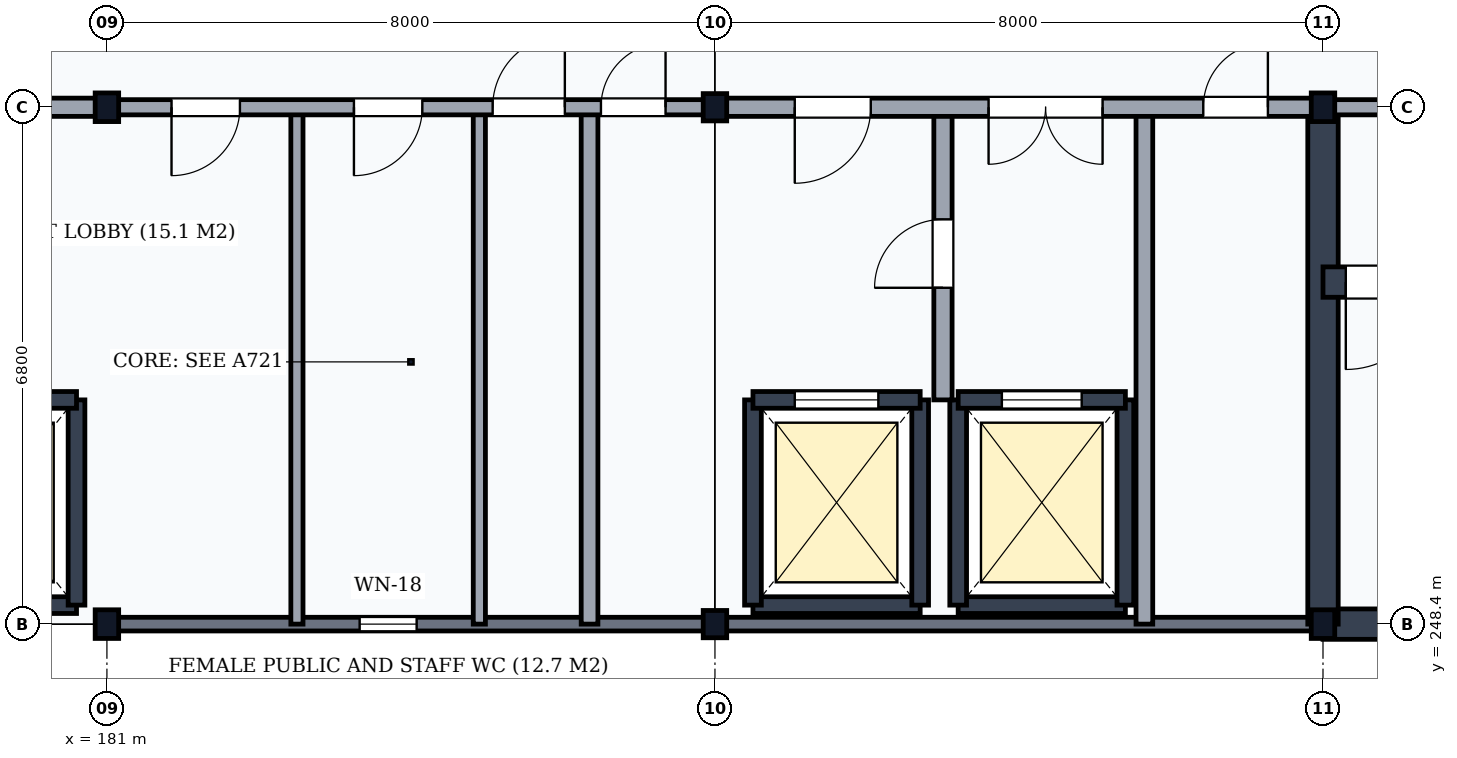
"""IFC4 building model, lengths in metres.
Left out: names, types, materials, properties, quantities, classifications, styles, units other than length and angle.
Written with IfcOpenShell. Run it as: python <this file> out.ifc"""

import sys

from ifc_helpers import new_model, si_unit, direction, frame, frame_2d, origin, origin_2d, place, context, subcontext, project, spatial, rectangle, i_section, extrude, element, fill, save


model = new_model("IFC4")
c1 = context("Model", 3, precision=1e-05, world=origin(), true_north=direction((0.0, 1.0)))
c2 = subcontext(c1, "Body", "Model", "MODEL_VIEW")
j1 = project(units=[si_unit("LENGTHUNIT", "METRE"), si_unit("PLANEANGLEUNIT", "RADIAN")], contexts=[c1])
p1 = place(None, origin())
s1 = spatial("IfcSite", under=j1, at=p1, CompositionType="ELEMENT")
p2 = place(p1, origin())
s2 = spatial("IfcBuilding", under=s1, at=p2, CompositionType="ELEMENT")
p3 = place(p2, frame((0.0, 0.0, 43.8)))
s3 = spatial("IfcBuildingStorey", under=s2, at=p3, CompositionType="ELEMENT", Elevation=43.8)
for number, where, z_axis, x_axis in (
    (1, (181.0, 248.4, 0.0), (0.0, 0.0, 1.0), (1.0, 0.0, 0.0)),
    (2, (181.0, 255.2, 0.0), (0.0, 0.0, 1.0), (1.0, 0.0, 0.0)),
):
    element("IfcColumn", number, at=place(p3, frame(where, z_axis=z_axis, x_axis=x_axis)), inside=s3, PredefinedType="COLUMN", context=c2, shape_type="SweptSolid", body=[
        extrude(i_section(OverallWidth=0.309, OverallDepth=0.377, WebThickness=0.021, FlangeThickness=0.04, FilletRadius=0.027, at=origin_2d()), origin(), (0.0, 0.0, 1.0), 3.9),
    ])
for number, where, z_axis, x_axis in (
    (3, (189.0, 248.4, 0.0), (0.0, 0.0, 1.0), (1.0, 0.0, 0.0)),
    (4, (189.0, 255.2, 0.0), (0.0, 0.0, 1.0), (1.0, 0.0, 0.0)),
):
    element("IfcColumn", number, at=place(p3, frame(where, z_axis=z_axis, x_axis=x_axis)), inside=s3, PredefinedType="COLUMN", context=c2, shape_type="SweptSolid", body=[
        extrude(i_section(OverallWidth=0.309, OverallDepth=0.359, WebThickness=0.021, FlangeThickness=0.04, FilletRadius=0.027, at=origin_2d()), origin(), (0.0, 0.0, 1.0), 3.9),
    ])
for number, where, z_axis, x_axis in (
    (5, (197.0, 248.4, 0.0), (0.0, 0.0, 1.0), (1.0, 0.0, 0.0)),
    (6, (197.0, 255.2, 0.0), (0.0, 0.0, 1.0), (1.0, 0.0, 0.0)),
):
    element("IfcColumn", number, at=place(p3, frame(where, z_axis=z_axis, x_axis=x_axis)), inside=s3, PredefinedType="COLUMN", context=c2, shape_type="SweptSolid", body=[
        extrude(i_section(OverallWidth=0.309, OverallDepth=0.377, WebThickness=0.021, FlangeThickness=0.04, FilletRadius=0.027, at=origin_2d()), origin(), (0.0, 0.0, 1.0), 3.9),
    ])
p4 = place(p3, frame((181.006, 248.4, 0.0), z_axis=(0.0, 0.0, 1.0), x_axis=(1.0, 0.0, 0.0)))
e7 = element("IfcWall", 7, at=p4, inside=s3, PredefinedType="SOLIDWALL", context=c2, shape_type="SweptSolid", body=[
    extrude(rectangle(XDim=7.988, YDim=0.18, at=frame_2d((3.994, 0.0))), origin(), (0.0, 0.0, 1.0), 3.368),
])
p5 = place(p4, frame((3.319, 0.0, 0.85)))
e8 = element("IfcOpeningElement", 8, at=p5, cuts=e7, PredefinedType="OPENING", context=c2, shape_type="SweptSolid", body=[
    extrude(rectangle(XDim=0.75, YDim=2.0, at=frame_2d((0.375, 1.0))), frame((0.0, 0.105, 0.0), z_axis=(0.0, -1.0, 0.0), x_axis=(1.0, 0.0, 0.0)), (0.0, 0.0, 1.0), 0.21),
])
p6 = place(p3, frame((189.006, 248.4, 0.0), z_axis=(0.0, 0.0, 1.0), x_axis=(1.0, 0.0, 0.0)))
e9 = element("IfcWall", 9, at=p6, inside=s3, PredefinedType="SOLIDWALL", context=c2, shape_type="SweptSolid", body=[
    extrude(rectangle(XDim=7.988, YDim=0.18, at=frame_2d((3.994, 0.0))), origin(), (0.0, 0.0, 1.0), 3.368),
])
p7 = place(p3, frame((197.0, 248.4, 0.0), z_axis=(0.0, 0.0, 1.0), x_axis=(1.0, 0.0, 0.0)))
e10 = element("IfcWall", 10, at=p7, inside=s3, PredefinedType="SHEAR", context=c2, shape_type="SweptSolid", body=[
    extrude(rectangle(XDim=8.0, YDim=0.4, at=frame_2d((4.0, 0.0))), origin(), (0.0, 0.0, 1.0), 3.68),
])
p8 = place(p3, frame((197.0, 248.4, 0.0), z_axis=(0.0, 0.0, 1.0), x_axis=(0.0, 1.0, 0.0)))
e11 = element("IfcWall", 11, at=p8, inside=s3, PredefinedType="SHEAR", context=c2, shape_type="SweptSolid", body=[
    extrude(rectangle(XDim=6.8, YDim=0.4, at=frame_2d((3.4, 0.0))), origin(), (0.0, 0.0, 1.0), 3.68),
])
p9 = place(p3, frame((197.0, 252.9, 0.0), z_axis=(0.0, 0.0, 1.0), x_axis=(1.0, 0.0, 0.0)))
e12 = element("IfcWall", 12, at=p9, inside=s3, PredefinedType="SHEAR", context=c2, shape_type="SweptSolid", body=[
    extrude(rectangle(XDim=8.0, YDim=0.4, at=frame_2d((4.0, 0.0))), origin(), (0.0, 0.0, 1.0), 3.68),
])
p10 = place(p9, frame((0.3, 0.0, 0.0)))
e13 = element("IfcOpeningElement", 13, at=p10, cuts=e12, PredefinedType="OPENING", context=c2, shape_type="SweptSolid", body=[
    extrude(rectangle(XDim=1.15, YDim=2.15, at=frame_2d((0.575, 1.075))), frame((0.0, 0.215, 0.0), z_axis=(0.0, -1.0, 0.0), x_axis=(1.0, 0.0, 0.0)), (0.0, 0.0, 1.0), 0.43),
])
p11 = place(p3, frame((197.0, 255.2, 0.0), z_axis=(0.0, 0.0, 1.0), x_axis=(1.0, 0.0, 0.0)))
e14 = element("IfcWall", 14, at=p11, inside=s3, PredefinedType="PARTITIONING", context=c2, shape_type="SweptSolid", body=[
    extrude(rectangle(XDim=8.0, YDim=0.2, at=frame_2d((4.0, 0.0))), origin(), (0.0, 0.0, 1.0), 3.178),
])
p12 = place(p11, frame((3.275, 0.0, 0.0)))
e15 = element("IfcOpeningElement", 15, at=p12, cuts=e14, PredefinedType="OPENING", context=c2, shape_type="SweptSolid", body=[
    extrude(rectangle(XDim=1.45, YDim=2.2, at=frame_2d((0.725, 1.1))), frame((0.0, 0.115, 0.0), z_axis=(0.0, -1.0, 0.0), x_axis=(1.0, 0.0, 0.0)), (0.0, 0.0, 1.0), 0.23),
])
p13 = place(p3, frame((178.4, 248.65, 0.0), z_axis=(0.0, 0.0, 1.0), x_axis=(1.0, 0.0, 0.0)))
e16 = element("IfcWall", 16, at=p13, inside=s3, PredefinedType="SHEAR", context=c2, shape_type="SweptSolid", body=[
    extrude(rectangle(XDim=2.2, YDim=0.22, at=frame_2d((1.1, 0.0))), origin(), (0.0, 0.0, 1.0), 3.68),
])
p14 = place(p3, frame((180.6, 248.65, 0.0), z_axis=(0.0, 0.0, 1.0), x_axis=(0.0, 1.0, 0.0)))
e17 = element("IfcWall", 17, at=p14, inside=s3, PredefinedType="SHEAR", context=c2, shape_type="SweptSolid", body=[
    extrude(rectangle(XDim=2.7, YDim=0.22, at=frame_2d((1.35, 0.0))), origin(), (0.0, 0.0, 1.0), 3.68),
])
p15 = place(p3, frame((178.4, 251.35, 0.0), z_axis=(0.0, 0.0, 1.0), x_axis=(1.0, 0.0, 0.0)))
e18 = element("IfcWall", 18, at=p15, inside=s3, PredefinedType="SHEAR", context=c2, shape_type="SweptSolid", body=[
    extrude(rectangle(XDim=2.2, YDim=0.22, at=frame_2d((1.1, 0.0))), origin(), (0.0, 0.0, 1.0), 3.68),
])
p16 = place(p15, frame((0.575, 0.0, 0.0)))
e19 = element("IfcOpeningElement", 19, at=p16, cuts=e18, PredefinedType="OPENING", context=c2, shape_type="SweptSolid", body=[
    extrude(rectangle(XDim=1.05, YDim=2.15, at=frame_2d((0.525, 1.075))), frame((0.0, 0.125, 0.0), z_axis=(0.0, -1.0, 0.0), x_axis=(1.0, 0.0, 0.0)), (0.0, 0.0, 1.0), 0.25),
])
p17 = place(p3, frame((189.5, 248.65, 0.0), z_axis=(0.0, 0.0, 1.0), x_axis=(1.0, 0.0, 0.0)))
e20 = element("IfcWall", 20, at=p17, inside=s3, PredefinedType="SHEAR", context=c2, shape_type="SweptSolid", body=[
    extrude(rectangle(XDim=2.2, YDim=0.22, at=frame_2d((1.1, 0.0))), origin(), (0.0, 0.0, 1.0), 3.68),
])
for number, where, z_axis, x_axis in (
    (21, (189.5, 248.65, 0.0), (0.0, 0.0, 1.0), (0.0, 1.0, 0.0)),
    (22, (191.7, 248.65, 0.0), (0.0, 0.0, 1.0), (0.0, 1.0, 0.0)),
):
    element("IfcWall", number, at=place(p3, frame(where, z_axis=z_axis, x_axis=x_axis)), inside=s3, PredefinedType="SHEAR", context=c2, shape_type="SweptSolid", body=[
        extrude(rectangle(XDim=2.7, YDim=0.22, at=frame_2d((1.35, 0.0))), origin(), (0.0, 0.0, 1.0), 3.68),
    ])
p18 = place(p3, frame((189.5, 251.35, 0.0), z_axis=(0.0, 0.0, 1.0), x_axis=(1.0, 0.0, 0.0)))
e23 = element("IfcWall", 23, at=p18, inside=s3, PredefinedType="SHEAR", context=c2, shape_type="SweptSolid", body=[
    extrude(rectangle(XDim=2.2, YDim=0.22, at=frame_2d((1.1, 0.0))), origin(), (0.0, 0.0, 1.0), 3.68),
])
p19 = place(p18, frame((0.55, 0.0, 0.0)))
e24 = element("IfcOpeningElement", 24, at=p19, cuts=e23, PredefinedType="OPENING", context=c2, shape_type="SweptSolid", body=[
    extrude(rectangle(XDim=1.1, YDim=2.15, at=frame_2d((0.55, 1.075))), frame((0.0, 0.125, 0.0), z_axis=(0.0, -1.0, 0.0), x_axis=(1.0, 0.0, 0.0)), (0.0, 0.0, 1.0), 0.25),
])
p20 = place(p3, frame((192.2, 248.65, 0.0), z_axis=(0.0, 0.0, 1.0), x_axis=(1.0, 0.0, 0.0)))
e25 = element("IfcWall", 25, at=p20, inside=s3, PredefinedType="SHEAR", context=c2, shape_type="SweptSolid", body=[
    extrude(rectangle(XDim=2.2, YDim=0.22, at=frame_2d((1.1, 0.0))), origin(), (0.0, 0.0, 1.0), 3.68),
])
for number, where, z_axis, x_axis in (
    (26, (192.2, 248.65, 0.0), (0.0, 0.0, 1.0), (0.0, 1.0, 0.0)),
    (27, (194.4, 248.65, 0.0), (0.0, 0.0, 1.0), (0.0, 1.0, 0.0)),
):
    element("IfcWall", number, at=place(p3, frame(where, z_axis=z_axis, x_axis=x_axis)), inside=s3, PredefinedType="SHEAR", context=c2, shape_type="SweptSolid", body=[
        extrude(rectangle(XDim=2.7, YDim=0.22, at=frame_2d((1.35, 0.0))), origin(), (0.0, 0.0, 1.0), 3.68),
    ])
p21 = place(p3, frame((192.2, 251.35, 0.0), z_axis=(0.0, 0.0, 1.0), x_axis=(1.0, 0.0, 0.0)))
e28 = element("IfcWall", 28, at=p21, inside=s3, PredefinedType="SHEAR", context=c2, shape_type="SweptSolid", body=[
    extrude(rectangle(XDim=2.2, YDim=0.22, at=frame_2d((1.1, 0.0))), origin(), (0.0, 0.0, 1.0), 3.68),
])
p22 = place(p21, frame((0.575, 0.0, 0.0)))
e29 = element("IfcOpeningElement", 29, at=p22, cuts=e28, PredefinedType="OPENING", context=c2, shape_type="SweptSolid", body=[
    extrude(rectangle(XDim=1.05, YDim=2.15, at=frame_2d((0.525, 1.075))), frame((0.0, 0.125, 0.0), z_axis=(0.0, -1.0, 0.0), x_axis=(1.0, 0.0, 0.0)), (0.0, 0.0, 1.0), 0.25),
])
p23 = place(p3, frame((192.0, 251.35, 0.0), z_axis=(0.0, 0.0, 1.0), x_axis=(0.0, 1.0, 0.0)))
e30 = element("IfcWall", 30, at=p23, inside=s3, PredefinedType="PARTITIONING", context=c2, shape_type="SweptSolid", body=[
    extrude(rectangle(XDim=3.85, YDim=0.24, at=frame_2d((1.925, 0.0))), origin(), (0.0, 0.0, 1.0), 3.68),
])
p24 = place(p23, frame((1.475, 0.0, 0.0)))
e31 = element("IfcOpeningElement", 31, at=p24, cuts=e30, PredefinedType="OPENING", context=c2, shape_type="SweptSolid", body=[
    extrude(rectangle(XDim=0.9, YDim=2.1, at=frame_2d((0.45, 1.05))), frame((0.0, 0.135, 0.0), z_axis=(0.0, -1.0, 0.0), x_axis=(1.0, 0.0, 0.0)), (0.0, 0.0, 1.0), 0.27),
])
p25 = place(p3, frame((194.65, 248.4, 0.0), z_axis=(0.0, 0.0, 1.0), x_axis=(0.0, 1.0, 0.0)))
e32 = element("IfcWall", 32, at=p25, inside=s3, PredefinedType="PARTITIONING", context=c2, shape_type="SweptSolid", body=[
    extrude(rectangle(XDim=6.8, YDim=0.22, at=frame_2d((3.4, 0.0))), origin(), (0.0, 0.0, 1.0), 3.68),
])
for number, where, z_axis, x_axis in (
    (33, (183.5, 248.4, 0.0), (0.0, 0.0, 1.0), (0.0, 1.0, 0.0)),
    (34, (185.9, 248.4, 0.0), (0.0, 0.0, 1.0), (0.0, 1.0, 0.0)),
):
    element("IfcWall", number, at=place(p3, frame(where, z_axis=z_axis, x_axis=x_axis)), inside=s3, PredefinedType="PARTITIONING", context=c2, shape_type="SweptSolid", body=[
        extrude(rectangle(XDim=6.8, YDim=0.16, at=frame_2d((3.4, 0.0))), origin(), (0.0, 0.0, 1.0), 3.68),
    ])
p26 = place(p3, frame((187.35, 248.4, 0.0), z_axis=(0.0, 0.0, 1.0), x_axis=(0.0, 1.0, 0.0)))
e35 = element("IfcWall", 35, at=p26, inside=s3, PredefinedType="PARTITIONING", context=c2, shape_type="SweptSolid", body=[
    extrude(rectangle(XDim=6.8, YDim=0.22, at=frame_2d((3.4, 0.0))), origin(), (0.0, 0.0, 1.0), 3.68),
])
p27 = place(p3, frame((173.0, 255.2, 0.0), z_axis=(0.0, 0.0, 1.0), x_axis=(1.0, 0.0, 0.0)))
e36 = element("IfcWall", 36, at=p27, inside=s3, PredefinedType="PARTITIONING", context=c2, shape_type="SweptSolid", body=[
    extrude(rectangle(XDim=8.0, YDim=0.24, at=frame_2d((4.0, 0.0))), origin(), (0.0, 0.0, 1.0), 3.178),
])
p28 = place(p27, frame((1.05, 0.0, 0.0)))
e37 = element("IfcOpeningElement", 37, at=p28, cuts=e36, PredefinedType="OPENING", context=c2, shape_type="SweptSolid", body=[
    extrude(rectangle(XDim=1.0, YDim=2.1, at=frame_2d((0.5, 1.05))), frame((0.0, 0.135, 0.0), z_axis=(0.0, -1.0, 0.0), x_axis=(1.0, 0.0, 0.0)), (0.0, 0.0, 1.0), 0.27),
])
p29 = place(p27, frame((4.6, 0.0, 0.0)))
e38 = element("IfcOpeningElement", 38, at=p29, cuts=e36, PredefinedType="OPENING", context=c2, shape_type="SweptSolid", body=[
    extrude(rectangle(XDim=1.6, YDim=2.25, at=frame_2d((0.8, 1.125))), frame((0.0, 0.135, 0.0), z_axis=(0.0, -1.0, 0.0), x_axis=(1.0, 0.0, 0.0)), (0.0, 0.0, 1.0), 0.27),
])
p30 = place(p3, frame((181.0, 255.2, 0.0), z_axis=(0.0, 0.0, 1.0), x_axis=(1.0, 0.0, 0.0)))
e39 = element("IfcWall", 39, at=p30, inside=s3, PredefinedType="PARTITIONING", context=c2, shape_type="SweptSolid", body=[
    extrude(rectangle(XDim=8.0, YDim=0.2, at=frame_2d((4.0, 0.0))), origin(), (0.0, 0.0, 1.0), 3.178),
])
p31 = place(p30, frame((0.85, 0.0, 0.0)))
e40 = element("IfcOpeningElement", 40, at=p31, cuts=e39, PredefinedType="OPENING", context=c2, shape_type="SweptSolid", body=[
    extrude(rectangle(XDim=0.9, YDim=2.1, at=frame_2d((0.45, 1.05))), frame((0.0, 0.115, 0.0), z_axis=(0.0, -1.0, 0.0), x_axis=(1.0, 0.0, 0.0)), (0.0, 0.0, 1.0), 0.23),
])
p32 = place(p30, frame((3.25, 0.0, 0.0)))
e41 = element("IfcOpeningElement", 41, at=p32, cuts=e39, PredefinedType="OPENING", context=c2, shape_type="SweptSolid", body=[
    extrude(rectangle(XDim=0.9, YDim=2.1, at=frame_2d((0.45, 1.05))), frame((0.0, 0.115, 0.0), z_axis=(0.0, -1.0, 0.0), x_axis=(1.0, 0.0, 0.0)), (0.0, 0.0, 1.0), 0.23),
])
p33 = place(p30, frame((5.075, 0.0, 0.0)))
e42 = element("IfcOpeningElement", 42, at=p33, cuts=e39, PredefinedType="OPENING", context=c2, shape_type="SweptSolid", body=[
    extrude(rectangle(XDim=0.95, YDim=2.1, at=frame_2d((0.475, 1.05))), frame((0.0, 0.115, 0.0), z_axis=(0.0, -1.0, 0.0), x_axis=(1.0, 0.0, 0.0)), (0.0, 0.0, 1.0), 0.23),
])
p34 = place(p30, frame((6.5, 0.0, 0.0)))
e43 = element("IfcOpeningElement", 43, at=p34, cuts=e39, PredefinedType="OPENING", context=c2, shape_type="SweptSolid", body=[
    extrude(rectangle(XDim=0.85, YDim=2.1, at=frame_2d((0.425, 1.05))), frame((0.0, 0.115, 0.0), z_axis=(0.0, -1.0, 0.0), x_axis=(1.0, 0.0, 0.0)), (0.0, 0.0, 1.0), 0.23),
])
p35 = place(p3, frame((189.0, 255.2, 0.0), z_axis=(0.0, 0.0, 1.0), x_axis=(1.0, 0.0, 0.0)))
e44 = element("IfcWall", 44, at=p35, inside=s3, PredefinedType="PARTITIONING", context=c2, shape_type="SweptSolid", body=[
    extrude(rectangle(XDim=8.0, YDim=0.24, at=frame_2d((4.0, 0.0))), origin(), (0.0, 0.0, 1.0), 3.178),
])
p36 = place(p35, frame((1.05, 0.0, 0.0)))
e45 = element("IfcOpeningElement", 45, at=p36, cuts=e44, PredefinedType="OPENING", context=c2, shape_type="SweptSolid", body=[
    extrude(rectangle(XDim=1.0, YDim=2.1, at=frame_2d((0.5, 1.05))), frame((0.0, 0.135, 0.0), z_axis=(0.0, -1.0, 0.0), x_axis=(1.0, 0.0, 0.0)), (0.0, 0.0, 1.0), 0.27),
])
p37 = place(p35, frame((3.6, 0.0, 0.0)))
e46 = element("IfcOpeningElement", 46, at=p37, cuts=e44, PredefinedType="OPENING", context=c2, shape_type="SweptSolid", body=[
    extrude(rectangle(XDim=1.5, YDim=2.25, at=frame_2d((0.75, 1.125))), frame((0.0, 0.135, 0.0), z_axis=(0.0, -1.0, 0.0), x_axis=(1.0, 0.0, 0.0)), (0.0, 0.0, 1.0), 0.27),
])
p38 = place(p35, frame((6.425, 0.0, 0.0)))
e47 = element("IfcOpeningElement", 47, at=p38, cuts=e44, PredefinedType="OPENING", context=c2, shape_type="SweptSolid", body=[
    extrude(rectangle(XDim=0.85, YDim=2.1, at=frame_2d((0.425, 1.05))), frame((0.0, 0.135, 0.0), z_axis=(0.0, -1.0, 0.0), x_axis=(1.0, 0.0, 0.0)), (0.0, 0.0, 1.0), 0.27),
])
p39 = place(p5, origin())
e48 = element("IfcWindow", 48, at=p39, inside=s3, PartitioningType="SINGLE_PANEL", PredefinedType="WINDOW", context=c2, shape_type="SweptSolid", body=[
    extrude(rectangle(XDim=0.75, YDim=2.0, at=frame_2d((0.375, 1.0))), frame((0.0, 0.03, 0.0), z_axis=(0.0, -1.0, 0.0), x_axis=(1.0, 0.0, 0.0)), (0.0, 0.0, 1.0), 0.06),
])
fill(e8, e48)
p40 = place(p10, frame((1.15, 0.0, 0.0), z_axis=(0.0, 0.0, 1.0), x_axis=(-1.0, 0.0, 0.0)))
e49 = element("IfcDoor", 49, at=p40, inside=s3, OperationType="SINGLE_SWING_RIGHT", PredefinedType="DOOR", context=c2, shape_type="SweptSolid", body=[
    extrude(rectangle(XDim=1.15, YDim=2.15, at=frame_2d((0.575, 1.075))), frame((0.0, 0.025, 0.0), z_axis=(0.0, -1.0, 0.0), x_axis=(1.0, 0.0, 0.0)), (0.0, 0.0, 1.0), 0.05),
])
fill(e13, e49)
p41 = place(p19, origin())
e50 = element("IfcDoor", 50, at=p41, inside=s3, OperationType="DOUBLE_DOOR_SLIDING", PredefinedType="USERDEFINED", context=c2, shape_type="SweptSolid", body=[
    extrude(rectangle(XDim=1.1, YDim=2.15, at=frame_2d((0.55, 1.075))), frame((0.0, 0.025, 0.0), z_axis=(0.0, -1.0, 0.0), x_axis=(1.0, 0.0, 0.0)), (0.0, 0.0, 1.0), 0.05),
])
fill(e24, e50)
p42 = place(p22, origin())
e51 = element("IfcDoor", 51, at=p42, inside=s3, OperationType="DOUBLE_DOOR_SLIDING", PredefinedType="USERDEFINED", context=c2, shape_type="SweptSolid", body=[
    extrude(rectangle(XDim=1.05, YDim=2.15, at=frame_2d((0.525, 1.075))), frame((0.0, 0.025, 0.0), z_axis=(0.0, -1.0, 0.0), x_axis=(1.0, 0.0, 0.0)), (0.0, 0.0, 1.0), 0.05),
])
fill(e29, e51)
p43 = place(p24, origin())
e52 = element("IfcDoor", 52, at=p43, inside=s3, OperationType="SINGLE_SWING_LEFT", PredefinedType="DOOR", context=c2, shape_type="SweptSolid", body=[
    extrude(rectangle(XDim=0.9, YDim=2.1, at=frame_2d((0.45, 1.05))), frame((0.0, 0.025, 0.0), z_axis=(0.0, -1.0, 0.0), x_axis=(1.0, 0.0, 0.0)), (0.0, 0.0, 1.0), 0.05),
])
fill(e31, e52)
p44 = place(p31, frame((0.9, 0.0, 0.0), z_axis=(0.0, 0.0, 1.0), x_axis=(-1.0, 0.0, 0.0)))
e53 = element("IfcDoor", 53, at=p44, inside=s3, OperationType="SINGLE_SWING_RIGHT", PredefinedType="DOOR", context=c2, shape_type="SweptSolid", body=[
    extrude(rectangle(XDim=0.9, YDim=2.1, at=frame_2d((0.45, 1.05))), frame((0.0, 0.025, 0.0), z_axis=(0.0, -1.0, 0.0), x_axis=(1.0, 0.0, 0.0)), (0.0, 0.0, 1.0), 0.05),
])
fill(e40, e53)
p45 = place(p32, frame((0.9, 0.0, 0.0), z_axis=(0.0, 0.0, 1.0), x_axis=(-1.0, 0.0, 0.0)))
e54 = element("IfcDoor", 54, at=p45, inside=s3, OperationType="SINGLE_SWING_RIGHT", PredefinedType="DOOR", context=c2, shape_type="SweptSolid", body=[
    extrude(rectangle(XDim=0.9, YDim=2.1, at=frame_2d((0.45, 1.05))), frame((0.0, 0.025, 0.0), z_axis=(0.0, -1.0, 0.0), x_axis=(1.0, 0.0, 0.0)), (0.0, 0.0, 1.0), 0.05),
])
fill(e41, e54)
p46 = place(p33, frame((0.95, 0.0, 0.0), z_axis=(0.0, 0.0, 1.0), x_axis=(-1.0, 0.0, 0.0)))
e55 = element("IfcDoor", 55, at=p46, inside=s3, OperationType="SINGLE_SWING_LEFT", PredefinedType="DOOR", context=c2, shape_type="SweptSolid", body=[
    extrude(rectangle(XDim=0.95, YDim=2.1, at=frame_2d((0.475, 1.05))), frame((0.0, 0.025, 0.0), z_axis=(0.0, -1.0, 0.0), x_axis=(1.0, 0.0, 0.0)), (0.0, 0.0, 1.0), 0.05),
])
fill(e42, e55)
p47 = place(p34, frame((0.85, 0.0, 0.0), z_axis=(0.0, 0.0, 1.0), x_axis=(-1.0, 0.0, 0.0)))
e56 = element("IfcDoor", 56, at=p47, inside=s3, OperationType="SINGLE_SWING_LEFT", PredefinedType="DOOR", context=c2, shape_type="SweptSolid", body=[
    extrude(rectangle(XDim=0.85, YDim=2.1, at=frame_2d((0.425, 1.05))), frame((0.0, 0.025, 0.0), z_axis=(0.0, -1.0, 0.0), x_axis=(1.0, 0.0, 0.0)), (0.0, 0.0, 1.0), 0.05),
])
fill(e43, e56)
p48 = place(p36, frame((1.0, 0.0, 0.0), z_axis=(0.0, 0.0, 1.0), x_axis=(-1.0, 0.0, 0.0)))
e57 = element("IfcDoor", 57, at=p48, inside=s3, OperationType="SINGLE_SWING_RIGHT", PredefinedType="DOOR", context=c2, shape_type="SweptSolid", body=[
    extrude(rectangle(XDim=1.0, YDim=2.1, at=frame_2d((0.5, 1.05))), frame((0.0, 0.025, 0.0), z_axis=(0.0, -1.0, 0.0), x_axis=(1.0, 0.0, 0.0)), (0.0, 0.0, 1.0), 0.05),
])
fill(e45, e57)
p49 = place(p37, frame((1.5, 0.0, 0.0), z_axis=(0.0, 0.0, 1.0), x_axis=(-1.0, 0.0, 0.0)))
e58 = element("IfcDoor", 58, at=p49, inside=s3, OperationType="DOUBLE_DOOR_SINGLE_SWING", PredefinedType="DOOR", context=c2, shape_type="SweptSolid", body=[
    extrude(rectangle(XDim=1.5, YDim=2.25, at=frame_2d((0.75, 1.125))), frame((0.0, 0.025, 0.0), z_axis=(0.0, -1.0, 0.0), x_axis=(1.0, 0.0, 0.0)), (0.0, 0.0, 1.0), 0.05),
])
fill(e46, e58)
p50 = place(p38, frame((0.85, 0.0, 0.0), z_axis=(0.0, 0.0, 1.0), x_axis=(-1.0, 0.0, 0.0)))
e59 = element("IfcDoor", 59, at=p50, inside=s3, OperationType="SINGLE_SWING_LEFT", PredefinedType="DOOR", context=c2, shape_type="SweptSolid", body=[
    extrude(rectangle(XDim=0.85, YDim=2.1, at=frame_2d((0.425, 1.05))), frame((0.0, 0.025, 0.0), z_axis=(0.0, -1.0, 0.0), x_axis=(1.0, 0.0, 0.0)), (0.0, 0.0, 1.0), 0.05),
])
fill(e47, e59)
save(model, sys.argv[1])
